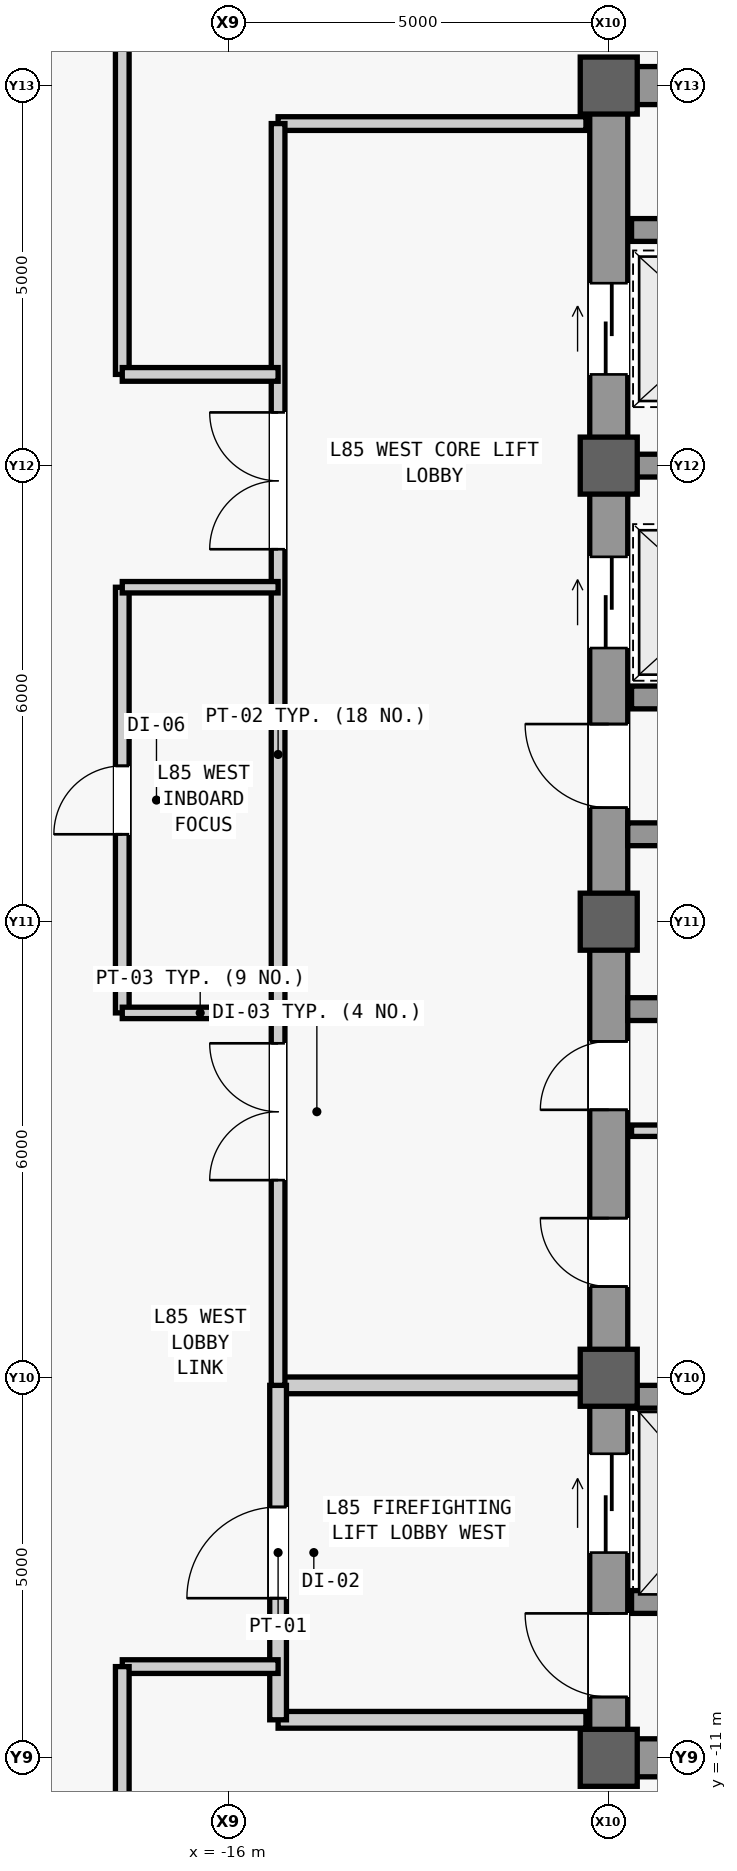
"""IFC4 building model, lengths in metres.
Left out: names, types, materials, properties, quantities, classifications, styles, units other than length and angle.
Written with IfcOpenShell. Run it as: python <this file> out.ifc"""

import sys

from ifc_helpers import new_model, si_unit, direction, frame, frame_2d, origin, origin_2d, place, context, subcontext, project, spatial, rectangle, extrude, source, transform, mapped, element, fill, save


model = new_model("IFC4")
c1 = context("Model", 3, precision=1e-05, world=origin(), true_north=direction((0.0, 1.0)))
c2 = subcontext(c1, "Body", "Model", "MODEL_VIEW")
j1 = project(units=[si_unit("LENGTHUNIT", "METRE"), si_unit("PLANEANGLEUNIT", "RADIAN")], contexts=[c1])
p1 = place(None, origin())
s1 = spatial("IfcSite", under=j1, at=p1, CompositionType="ELEMENT")
p2 = place(p1, origin())
s2 = spatial("IfcBuilding", under=s1, at=p2, CompositionType="ELEMENT")
p3 = place(p2, frame((0.0, 0.0, 358.3)))
s3 = spatial("IfcBuildingStorey", under=s2, at=p3, CompositionType="ELEMENT", Elevation=358.3)
m1 = source(origin(), c2, "Body", "SweptSolid", [
    extrude(rectangle(XDim=22.0, YDim=0.5, at=frame_2d((11.0, 0.0))), origin(), (0.0, 0.0, 1.0), 3.74),
])
p4 = place(p3, frame((-11.0, -11.0, 0.0), z_axis=(0.0, 0.0, 1.0), x_axis=(0.0, 1.0, 0.0)))
e1 = element("IfcWall", 1, at=p4, inside=s3, PredefinedType="SHEAR", context=c2, shape_type="MappedRepresentation", body=[
    mapped(m1, transform((0.0, 0.0, 0.0), scale=1.0)),
])
m2 = source(origin(), c2, "Body", "SweptSolid", [
    extrude(rectangle(XDim=1.1, YDim=2.2, at=frame_2d((0.55, 1.1))), frame((0.0, 0.26, 0.0), z_axis=(0.0, -1.0, 0.0), x_axis=(1.0, 0.0, 0.0)), (0.0, 0.0, 1.0), 0.52),
])
p5 = place(p4, frame((0.8, 0.0, 0.0)))
e2 = element("IfcOpeningElement", 2, at=p5, cuts=e1, PredefinedType="OPENING", context=c2, shape_type="MappedRepresentation", body=[
    mapped(m2, transform((0.0, 0.0, 0.0), scale=1.0)),
])
p6 = place(p4, frame((12.5, 0.0, 0.0)))
e3 = element("IfcOpeningElement", 3, at=p6, cuts=e1, PredefinedType="OPENING", context=c2, shape_type="MappedRepresentation", body=[
    mapped(m2, transform((0.0, 0.0, 0.0), scale=1.0)),
])
m3 = source(origin(), c2, "Body", "SweptSolid", [
    extrude(rectangle(XDim=0.9, YDim=2.15, at=frame_2d((0.45, 1.075))), frame((0.0, 0.26, 0.0), z_axis=(0.0, -1.0, 0.0), x_axis=(1.0, 0.0, 0.0)), (0.0, 0.0, 1.0), 0.52),
])
p7 = place(p4, frame((6.2, 0.0, 0.0)))
e4 = element("IfcOpeningElement", 4, at=p7, cuts=e1, PredefinedType="OPENING", context=c2, shape_type="MappedRepresentation", body=[
    mapped(m3, transform((0.0, 0.0, 0.0), scale=1.0)),
])
p8 = place(p4, frame((8.525, 0.0, 0.0)))
e5 = element("IfcOpeningElement", 5, at=p8, cuts=e1, PredefinedType="OPENING", context=c2, shape_type="MappedRepresentation", body=[
    mapped(m3, transform((0.0, 0.0, 0.0), scale=1.0)),
])
m4 = source(origin(), c2, "Body", "SweptSolid", [
    extrude(rectangle(XDim=1.2, YDim=2.3, at=frame_2d((0.6, 1.15))), frame((0.0, 0.26, 0.0), z_axis=(0.0, -1.0, 0.0), x_axis=(1.0, 0.0, 0.0)), (0.0, 0.0, 1.0), 0.52),
])
p9 = place(p4, frame((14.6, 0.0, 0.0)))
e6 = element("IfcOpeningElement", 6, at=p9, cuts=e1, PredefinedType="OPENING", context=c2, shape_type="MappedRepresentation", body=[
    mapped(m4, transform((0.0, 0.0, 0.0), scale=1.0)),
])
p10 = place(p4, frame((18.2, 0.0, 0.0)))
e7 = element("IfcOpeningElement", 7, at=p10, cuts=e1, PredefinedType="OPENING", context=c2, shape_type="MappedRepresentation", body=[
    mapped(m4, transform((0.0, 0.0, 0.0), scale=1.0)),
])
m5 = source(origin(), c2, "Body", "SweptSolid", [
    extrude(rectangle(XDim=1.3, YDim=2.3, at=frame_2d((0.65, 1.15))), frame((0.0, 0.26, 0.0), z_axis=(0.0, -1.0, 0.0), x_axis=(1.0, 0.0, 0.0)), (0.0, 0.0, 1.0), 0.52),
])
p11 = place(p4, frame((2.7, 0.0, 0.0)))
e8 = element("IfcOpeningElement", 8, at=p11, cuts=e1, PredefinedType="OPENING", context=c2, shape_type="MappedRepresentation", body=[
    mapped(m5, transform((0.0, 0.0, 0.0), scale=1.0)),
])
m6 = source(origin(), c2, "Body", "SweptSolid", [
    extrude(rectangle(XDim=5.9, YDim=0.5, at=frame_2d((2.95, 0.0))), origin(), (0.0, 0.0, 1.0), 3.74),
])
for number, where, z_axis, x_axis in (
    (9, (-10.75, -11.0, 0.0), (0.0, 0.0, 1.0), (1.0, 0.0, 0.0)),
    (10, (-10.75, 11.0, 0.0), (0.0, 0.0, 1.0), (1.0, 0.0, 0.0)),
):
    element("IfcWall", number, at=place(p3, frame(where, z_axis=z_axis, x_axis=x_axis)), inside=s3, PredefinedType="SHEAR", context=c2, shape_type="MappedRepresentation", body=[
        mapped(m6, transform((0.0, 0.0, 0.0), scale=1.0)),
    ])
m7 = source(origin(), c2, "Body", "SweptSolid", [
    extrude(rectangle(XDim=5.65, YDim=0.3, at=frame_2d((2.825, 0.0))), origin(), (0.0, 0.0, 1.0), 3.74),
])
for number, where, z_axis, x_axis in (
    (11, (-10.75, -1.15, 0.0), (0.0, 0.0, 1.0), (1.0, 0.0, 0.0)),
    (12, (-10.75, 1.15, 0.0), (0.0, 0.0, 1.0), (1.0, 0.0, 0.0)),
):
    element("IfcWall", number, at=place(p3, frame(where, z_axis=z_axis, x_axis=x_axis)), inside=s3, PredefinedType="SHEAR", context=c2, shape_type="MappedRepresentation", body=[
        mapped(m7, transform((0.0, 0.0, 0.0), scale=1.0)),
    ])
m8 = source(origin(), c2, "Body", "SweptSolid", [
    extrude(rectangle(XDim=0.75, YDim=0.75, at=origin_2d()), origin(), (0.0, 0.0, 1.0), 4.0),
])
for number, where, z_axis, x_axis in (
    (13, (-11.0, -11.0, 0.0), (0.0, 0.0, 1.0), (1.0, 0.0, 0.0)),
    (14, (-11.0, -6.0, 0.0), (0.0, 0.0, 1.0), (1.0, 0.0, 0.0)),
    (15, (-11.0, 0.0, 0.0), (0.0, 0.0, 1.0), (1.0, 0.0, 0.0)),
    (16, (-11.0, 6.0, 0.0), (0.0, 0.0, 1.0), (1.0, 0.0, 0.0)),
    (17, (-11.0, 11.0, 0.0), (0.0, 0.0, 1.0), (1.0, 0.0, 0.0)),
):
    element("IfcColumn", number, at=place(p3, frame(where, z_axis=z_axis, x_axis=x_axis)), inside=s3, PredefinedType="COLUMN", context=c2, shape_type="MappedRepresentation", body=[
        mapped(m8, transform((0.0, 0.0, 0.0), scale=1.0)),
    ])
m9 = source(origin(), c2, "Body", "SweptSolid", [
    extrude(rectangle(XDim=2.2, YDim=0.3, at=frame_2d((1.1, 0.0))), origin(), (0.0, 0.0, 1.0), 3.74),
])
for number, where, z_axis, x_axis in (
    (18, (-10.7, -8.95, 0.0), (0.0, 0.0, 1.0), (1.0, 0.0, 0.0)),
    (19, (-10.7, -6.25, 0.0), (0.0, 0.0, 1.0), (1.0, 0.0, 0.0)),
    (20, (-10.7, 2.95, 0.0), (0.0, 0.0, 1.0), (1.0, 0.0, 0.0)),
    (21, (-10.7, 6.0, 0.0), (0.0, 0.0, 1.0), (1.0, 0.0, 0.0)),
    (22, (-10.7, 9.1, 0.0), (0.0, 0.0, 1.0), (1.0, 0.0, 0.0)),
):
    element("IfcWall", number, at=place(p3, frame(where, z_axis=z_axis, x_axis=x_axis)), inside=s3, PredefinedType="SHEAR", context=c2, shape_type="MappedRepresentation", body=[
        mapped(m9, transform((0.0, 0.0, 0.0), scale=1.0)),
    ])
m10 = source(origin(), c2, "Body", "SweptSolid", [
    extrude(rectangle(XDim=2.05, YDim=0.15, at=frame_2d((1.025, 0.0))), origin(), (0.0, 0.0, 1.0), 3.74),
])
p12 = place(p3, frame((-10.7, -2.75, 0.0), z_axis=(0.0, 0.0, 1.0), x_axis=(1.0, 0.0, 0.0)))
e23 = element("IfcWall", 23, at=p12, inside=s3, PredefinedType="PARTITIONING", context=c2, shape_type="MappedRepresentation", body=[
    mapped(m10, transform((0.0, 0.0, 0.0), scale=1.0)),
])
m11 = source(origin(), c2, "Body", "SweptSolid", [
    extrude(rectangle(XDim=4.05, YDim=0.22, at=frame_2d((2.025, 0.0))), origin(), (0.0, 0.0, 1.0), 3.74),
])
p13 = place(p3, frame((-15.35, -10.5, 0.0), z_axis=(0.0, 0.0, 1.0), x_axis=(1.0, 0.0, 0.0)))
e24 = element("IfcWall", 24, at=p13, inside=s3, PredefinedType="PARTITIONING", context=c2, shape_type="MappedRepresentation", body=[
    mapped(m11, transform((0.0, 0.0, 0.0), scale=1.0)),
])
m12 = source(origin(), c2, "Body", "SweptSolid", [
    extrude(rectangle(XDim=4.05, YDim=0.22, at=frame_2d((2.025, 0.0))), origin(), (0.0, 0.0, 1.0), 3.124),
])
p14 = place(p3, frame((-15.35, -6.1, 0.0), z_axis=(0.0, 0.0, 1.0), x_axis=(1.0, 0.0, 0.0)))
e25 = element("IfcWall", 25, at=p14, inside=s3, PredefinedType="PARTITIONING", context=c2, shape_type="MappedRepresentation", body=[
    mapped(m12, transform((0.0, 0.0, 0.0), scale=1.0)),
])
m13 = source(origin(), c2, "Body", "SweptSolid", [
    extrude(rectangle(XDim=4.4, YDim=0.22, at=frame_2d((2.2, 0.0))), origin(), (0.0, 0.0, 1.0), 3.74),
])
p15 = place(p3, frame((-15.35, -10.5, 0.0), z_axis=(0.0, 0.0, 1.0), x_axis=(0.0, 1.0, 0.0)))
e26 = element("IfcWall", 26, at=p15, inside=s3, PredefinedType="PARTITIONING", context=c2, shape_type="MappedRepresentation", body=[
    mapped(m13, transform((0.0, 0.0, 0.0), scale=1.0)),
])
m14 = source(origin(), c2, "Body", "SweptSolid", [
    extrude(rectangle(XDim=1.2, YDim=2.2, at=frame_2d((0.6, 1.1))), frame((0.0, 0.12, 0.0), z_axis=(0.0, -1.0, 0.0), x_axis=(1.0, 0.0, 0.0)), (0.0, 0.0, 1.0), 0.24),
])
p16 = place(p15, frame((1.6, 0.0, 0.0)))
e27 = element("IfcOpeningElement", 27, at=p16, cuts=e26, PredefinedType="OPENING", context=c2, shape_type="MappedRepresentation", body=[
    mapped(m14, transform((0.0, 0.0, 0.0), scale=1.0)),
])
m15 = source(origin(), c2, "Body", "SweptSolid", [
    extrude(rectangle(XDim=4.05, YDim=0.18, at=frame_2d((2.025, 0.0))), origin(), (0.0, 0.0, 1.0), 3.74),
])
p17 = place(p3, frame((-15.35, 10.5, 0.0), z_axis=(0.0, 0.0, 1.0), x_axis=(1.0, 0.0, 0.0)))
e28 = element("IfcWall", 28, at=p17, inside=s3, PredefinedType="PARTITIONING", context=c2, shape_type="MappedRepresentation", body=[
    mapped(m15, transform((0.0, 0.0, 0.0), scale=1.0)),
])
m16 = source(origin(), c2, "Body", "SweptSolid", [
    extrude(rectangle(XDim=16.6, YDim=0.18, at=frame_2d((8.3, 0.0))), origin(), (0.0, 0.0, 1.0), 3.74),
])
p18 = place(p3, frame((-15.35, -6.1, 0.0), z_axis=(0.0, 0.0, 1.0), x_axis=(0.0, 1.0, 0.0)))
e29 = element("IfcWall", 29, at=p18, inside=s3, PredefinedType="PARTITIONING", context=c2, shape_type="MappedRepresentation", body=[
    mapped(m16, transform((0.0, 0.0, 0.0), scale=1.0)),
])
m17 = source(origin(), c2, "Body", "SweptSolid", [
    extrude(rectangle(XDim=1.8, YDim=2.25, at=frame_2d((0.9, 1.125))), frame((0.0, 0.1, 0.0), z_axis=(0.0, -1.0, 0.0), x_axis=(1.0, 0.0, 0.0)), (0.0, 0.0, 1.0), 0.2),
])
p19 = place(p18, frame((2.7, 0.0, 0.0)))
e30 = element("IfcOpeningElement", 30, at=p19, cuts=e29, PredefinedType="OPENING", context=c2, shape_type="MappedRepresentation", body=[
    mapped(m17, transform((0.0, 0.0, 0.0), scale=1.0)),
])
p20 = place(p18, frame((11.0, 0.0, 0.0)))
e31 = element("IfcOpeningElement", 31, at=p20, cuts=e29, PredefinedType="OPENING", context=c2, shape_type="MappedRepresentation", body=[
    mapped(m17, transform((0.0, 0.0, 0.0), scale=1.0)),
])
m18 = source(origin(), c2, "Body", "SweptSolid", [
    extrude(rectangle(XDim=5.6, YDim=0.18, at=frame_2d((2.8, 0.0))), origin(), (0.0, 0.0, 1.0), 3.74),
])
p21 = place(p3, frame((-17.4, -1.2, 0.0), z_axis=(0.0, 0.0, 1.0), x_axis=(0.0, 1.0, 0.0)))
e32 = element("IfcWall", 32, at=p21, inside=s3, PredefinedType="PARTITIONING", context=c2, shape_type="MappedRepresentation", body=[
    mapped(m18, transform((0.0, 0.0, 0.0), scale=1.0)),
])
m19 = source(origin(), c2, "Body", "SweptSolid", [
    extrude(rectangle(XDim=0.9, YDim=2.15, at=frame_2d((0.45, 1.075))), frame((0.0, 0.1, 0.0), z_axis=(0.0, -1.0, 0.0), x_axis=(1.0, 0.0, 0.0)), (0.0, 0.0, 1.0), 0.2),
])
p22 = place(p21, frame((2.35, 0.0, 0.0)))
e33 = element("IfcOpeningElement", 33, at=p22, cuts=e32, PredefinedType="OPENING", context=c2, shape_type="MappedRepresentation", body=[
    mapped(m19, transform((0.0, 0.0, 0.0), scale=1.0)),
])
m20 = source(origin(), c2, "Body", "SweptSolid", [
    extrude(rectangle(XDim=2.05, YDim=0.15, at=frame_2d((1.025, 0.0))), origin(), (0.0, 0.0, 1.0), 3.74),
])
for number, where, z_axis, x_axis in (
    (34, (-17.4, -1.2, 0.0), (0.0, 0.0, 1.0), (1.0, 0.0, 0.0)),
    (35, (-17.4, 4.4, 0.0), (0.0, 0.0, 1.0), (1.0, 0.0, 0.0)),
):
    element("IfcWall", number, at=place(p3, frame(where, z_axis=z_axis, x_axis=x_axis)), inside=s3, PredefinedType="PARTITIONING", context=c2, shape_type="MappedRepresentation", body=[
        mapped(m20, transform((0.0, 0.0, 0.0), scale=1.0)),
    ])
m21 = source(origin(), c2, "Body", "SweptSolid", [
    extrude(rectangle(XDim=2.05, YDim=0.18, at=frame_2d((1.025, 0.0))), origin(), (0.0, 0.0, 1.0), 3.74),
])
p23 = place(p3, frame((-17.4, -9.8, 0.0), z_axis=(0.0, 0.0, 1.0), x_axis=(1.0, 0.0, 0.0)))
e36 = element("IfcWall", 36, at=p23, inside=s3, PredefinedType="PARTITIONING", context=c2, shape_type="MappedRepresentation", body=[
    mapped(m21, transform((0.0, 0.0, 0.0), scale=1.0)),
])
m22 = source(origin(), c2, "Body", "SweptSolid", [
    extrude(rectangle(XDim=8.4, YDim=0.18, at=frame_2d((4.2, 0.0))), origin(), (0.0, 0.0, 1.0), 3.74),
])
p24 = place(p3, frame((-17.4, 7.2, 0.0), z_axis=(0.0, 0.0, 1.0), x_axis=(0.0, 1.0, 0.0)))
e37 = element("IfcWall", 37, at=p24, inside=s3, PredefinedType="PARTITIONING", context=c2, shape_type="MappedRepresentation", body=[
    mapped(m22, transform((0.0, 0.0, 0.0), scale=1.0)),
])
p25 = place(p3, frame((-17.4, 7.2, 0.0), z_axis=(0.0, 0.0, 1.0), x_axis=(1.0, 0.0, 0.0)))
e38 = element("IfcWall", 38, at=p25, inside=s3, PredefinedType="PARTITIONING", context=c2, shape_type="MappedRepresentation", body=[
    mapped(m21, transform((0.0, 0.0, 0.0), scale=1.0)),
])
m23 = source(origin(), c2, "Body", "SweptSolid", [
    extrude(rectangle(XDim=6.5, YDim=0.18, at=frame_2d((3.25, 0.0))), origin(), (0.0, 0.0, 1.0), 3.74),
])
p26 = place(p3, frame((-17.4, -16.3, 0.0), z_axis=(0.0, 0.0, 1.0), x_axis=(0.0, 1.0, 0.0)))
e39 = element("IfcWall", 39, at=p26, inside=s3, PredefinedType="PARTITIONING", context=c2, shape_type="MappedRepresentation", body=[
    mapped(m23, transform((0.0, 0.0, 0.0), scale=1.0)),
])
m24 = source(origin(), c2, "Body", "SweptSolid", [
    extrude(rectangle(XDim=1.1, YDim=2.2, at=frame_2d((0.55, 1.1))), frame((0.0, 0.025, 0.0), z_axis=(0.0, -1.0, 0.0), x_axis=(1.0, 0.0, 0.0)), (0.0, 0.0, 1.0), 0.05),
])
p27 = place(p5, origin())
e40 = element("IfcDoor", 40, at=p27, inside=s3, OperationType="SINGLE_SWING_RIGHT", PredefinedType="DOOR", context=c2, shape_type="MappedRepresentation", body=[
    mapped(m24, transform((0.0, 0.0, 0.0), scale=1.0)),
])
fill(e2, e40)
p28 = place(p6, origin())
e41 = element("IfcDoor", 41, at=p28, inside=s3, OperationType="SINGLE_SWING_RIGHT", PredefinedType="DOOR", context=c2, shape_type="MappedRepresentation", body=[
    mapped(m24, transform((0.0, 0.0, 0.0), scale=1.0)),
])
fill(e3, e41)
m25 = source(origin(), c2, "Body", "SweptSolid", [
    extrude(rectangle(XDim=0.9, YDim=2.15, at=frame_2d((0.45, 1.075))), frame((0.0, 0.025, 0.0), z_axis=(0.0, -1.0, 0.0), x_axis=(1.0, 0.0, 0.0)), (0.0, 0.0, 1.0), 0.05),
])
p29 = place(p7, origin())
e42 = element("IfcDoor", 42, at=p29, inside=s3, OperationType="SINGLE_SWING_RIGHT", PredefinedType="DOOR", context=c2, shape_type="MappedRepresentation", body=[
    mapped(m25, transform((0.0, 0.0, 0.0), scale=1.0)),
])
fill(e4, e42)
p30 = place(p8, origin())
e43 = element("IfcDoor", 43, at=p30, inside=s3, OperationType="SINGLE_SWING_LEFT", PredefinedType="DOOR", context=c2, shape_type="MappedRepresentation", body=[
    mapped(m25, transform((0.0, 0.0, 0.0), scale=1.0)),
])
fill(e5, e43)
m26 = source(origin(), c2, "Body", "SweptSolid", [
    extrude(rectangle(XDim=1.2, YDim=2.2, at=frame_2d((0.6, 1.1))), frame((0.0, 0.025, 0.0), z_axis=(0.0, -1.0, 0.0), x_axis=(1.0, 0.0, 0.0)), (0.0, 0.0, 1.0), 0.05),
])
p31 = place(p16, origin())
e44 = element("IfcDoor", 44, at=p31, inside=s3, OperationType="SINGLE_SWING_LEFT", PredefinedType="DOOR", context=c2, shape_type="MappedRepresentation", body=[
    mapped(m26, transform((0.0, 0.0, 0.0), scale=1.0)),
])
fill(e27, e44)
m27 = source(origin(), c2, "Body", "SweptSolid", [
    extrude(rectangle(XDim=1.8, YDim=2.25, at=frame_2d((0.9, 1.125))), frame((0.0, 0.025, 0.0), z_axis=(0.0, -1.0, 0.0), x_axis=(1.0, 0.0, 0.0)), (0.0, 0.0, 1.0), 0.05),
])
p32 = place(p19, origin())
e45 = element("IfcDoor", 45, at=p32, inside=s3, OperationType="SINGLE_SWING_LEFT", PredefinedType="DOOR", context=c2, shape_type="MappedRepresentation", body=[
    mapped(m27, transform((0.0, 0.0, 0.0), scale=1.0)),
])
fill(e30, e45)
p33 = place(p20, origin())
e46 = element("IfcDoor", 46, at=p33, inside=s3, OperationType="SINGLE_SWING_RIGHT", PredefinedType="DOOR", context=c2, shape_type="MappedRepresentation", body=[
    mapped(m27, transform((0.0, 0.0, 0.0), scale=1.0)),
])
fill(e31, e46)
p34 = place(p22, origin())
e47 = element("IfcDoor", 47, at=p34, inside=s3, OperationType="SINGLE_SWING_LEFT", PredefinedType="DOOR", context=c2, shape_type="MappedRepresentation", body=[
    mapped(m25, transform((0.0, 0.0, 0.0), scale=1.0)),
])
fill(e33, e47)
m28 = source(origin(), c2, "Body", "SweptSolid", [
    extrude(rectangle(XDim=1.2, YDim=2.3, at=frame_2d((0.6, 1.15))), frame((0.0, 0.025, 0.0), z_axis=(0.0, -1.0, 0.0), x_axis=(1.0, 0.0, 0.0)), (0.0, 0.0, 1.0), 0.05),
])
p35 = place(p9, origin())
e48 = element("IfcDoor", 48, at=p35, inside=s3, OperationType="SLIDING_TO_LEFT", PredefinedType="DOOR", context=c2, shape_type="MappedRepresentation", body=[
    mapped(m28, transform((0.0, 0.0, 0.0), scale=1.0)),
])
fill(e6, e48)
p36 = place(p10, origin())
e49 = element("IfcDoor", 49, at=p36, inside=s3, OperationType="SLIDING_TO_LEFT", PredefinedType="DOOR", context=c2, shape_type="MappedRepresentation", body=[
    mapped(m28, transform((0.0, 0.0, 0.0), scale=1.0)),
])
fill(e7, e49)
m29 = source(origin(), c2, "Body", "SweptSolid", [
    extrude(rectangle(XDim=1.3, YDim=2.3, at=frame_2d((0.65, 1.15))), frame((0.0, 0.025, 0.0), z_axis=(0.0, -1.0, 0.0), x_axis=(1.0, 0.0, 0.0)), (0.0, 0.0, 1.0), 0.05),
])
p37 = place(p11, origin())
e50 = element("IfcDoor", 50, at=p37, inside=s3, OperationType="SLIDING_TO_LEFT", PredefinedType="DOOR", context=c2, shape_type="MappedRepresentation", body=[
    mapped(m29, transform((0.0, 0.0, 0.0), scale=1.0)),
])
fill(e8, e50)
save(model, sys.argv[1])
